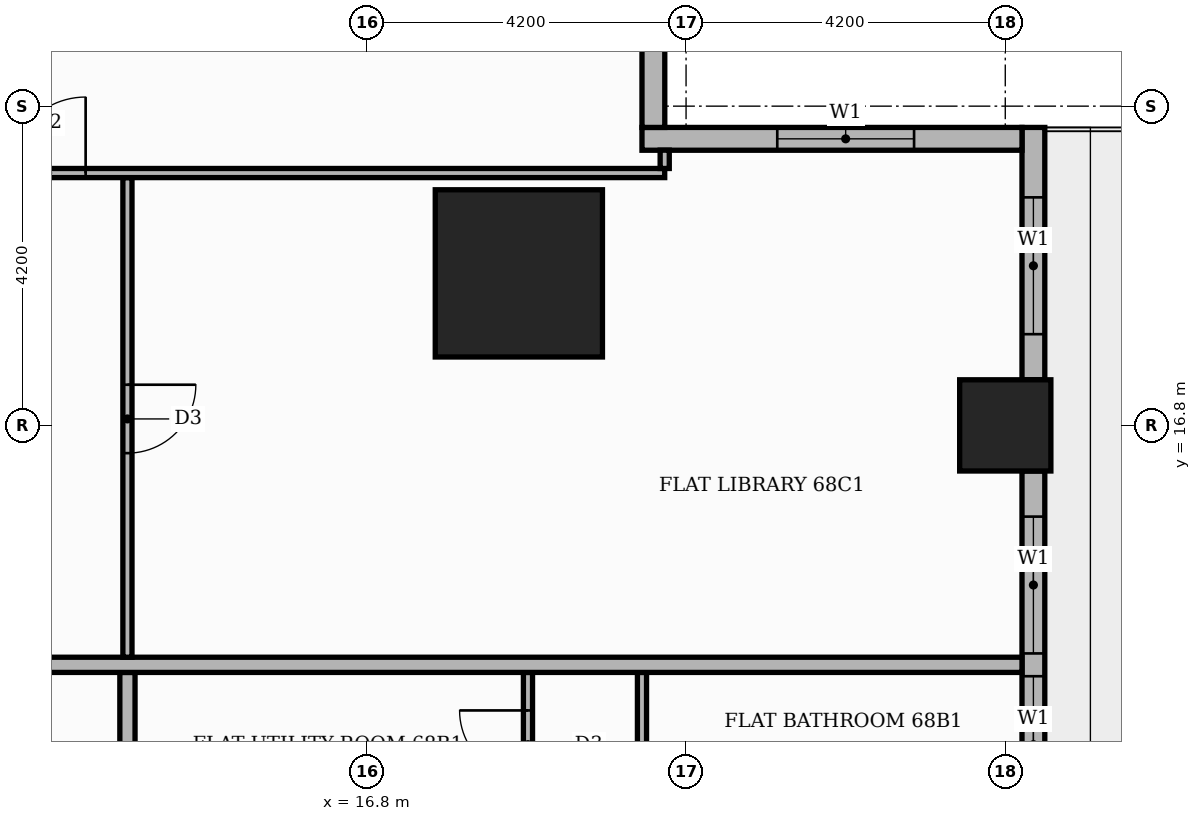
"""IFC4 building model, lengths in metres.
Left out: names, types, materials, properties, quantities, classifications, styles, units other than length and angle.
Written with IfcOpenShell. Run it as: python <this file> out.ifc"""

import sys

from ifc_helpers import new_model, si_unit, direction, frame, frame_2d, origin, origin_2d, place, context, subcontext, project, spatial, rectangle, extrude, element, fill, save


model = new_model("IFC4")
c1 = context("Model", 3, precision=1e-05, world=origin(), true_north=direction((0.0, 1.0)))
c2 = subcontext(c1, "Body", "Model", "MODEL_VIEW")
j1 = project(units=[si_unit("LENGTHUNIT", "METRE"), si_unit("PLANEANGLEUNIT", "RADIAN")], contexts=[c1])
p1 = place(None, origin())
s1 = spatial("IfcSite", under=j1, at=p1, CompositionType="ELEMENT")
p2 = place(p1, origin())
s2 = spatial("IfcBuilding", under=s1, at=p2, CompositionType="ELEMENT")
p3 = place(p2, frame((0.0, 0.0, 283.5)))
s3 = spatial("IfcBuildingStorey", under=s2, at=p3, CompositionType="ELEMENT", Elevation=283.5)
p4 = place(p3, frame((18.8, 18.8, 0.0), z_axis=(0.0, 0.0, 1.0), x_axis=(1.0, 0.0, 0.0)))
e1 = element("IfcColumn", 1, at=p4, inside=s3, PredefinedType="COLUMN", context=c2, shape_type="SweptSolid", body=[
    extrude(rectangle(XDim=2.2, YDim=2.2, at=origin_2d()), origin(), (0.0, 0.0, 1.0), 3.9),
])
p5 = place(p3, frame((25.2, 16.8, 0.0), z_axis=(0.0, 0.0, 1.0), x_axis=(1.0, 0.0, 0.0)))
e2 = element("IfcColumn", 2, at=p5, inside=s3, PredefinedType="COLUMN", context=c2, shape_type="SweptSolid", body=[
    extrude(rectangle(XDim=1.2, YDim=1.2, at=origin_2d()), origin(), (0.0, 0.0, 1.0), 3.9),
])
p6 = place(p3, frame((25.57, 9.0, 0.0), z_axis=(0.0, 0.0, 1.0), x_axis=(0.0, 1.0, 0.0)))
e3 = element("IfcWall", 3, at=p6, inside=s3, PredefinedType="STANDARD", context=c2, shape_type="SweptSolid", body=[
    extrude(rectangle(XDim=7.2, YDim=0.3, at=frame_2d((3.6, 0.0))), origin(), (0.0, 0.0, 1.0), 3.4),
])
p7 = place(p6, frame((0.6, 0.0, 0.9)))
e4 = element("IfcOpeningElement", 4, at=p7, cuts=e3, PredefinedType="OPENING", context=c2, shape_type="SweptSolid", body=[
    extrude(rectangle(XDim=1.8, YDim=2.1, at=frame_2d((0.9, 1.05))), frame((0.0, 0.16, 0.0), z_axis=(0.0, -1.0, 0.0), x_axis=(1.0, 0.0, 0.0)), (0.0, 0.0, 1.0), 0.32),
])
p8 = place(p6, frame((2.7, 0.0, 0.9)))
e5 = element("IfcOpeningElement", 5, at=p8, cuts=e3, PredefinedType="OPENING", context=c2, shape_type="SweptSolid", body=[
    extrude(rectangle(XDim=1.8, YDim=2.1, at=frame_2d((0.9, 1.05))), frame((0.0, 0.16, 0.0), z_axis=(0.0, -1.0, 0.0), x_axis=(1.0, 0.0, 0.0)), (0.0, 0.0, 1.0), 0.32),
])
p9 = place(p6, frame((4.8, 0.0, 0.9)))
e6 = element("IfcOpeningElement", 6, at=p9, cuts=e3, PredefinedType="OPENING", context=c2, shape_type="SweptSolid", body=[
    extrude(rectangle(XDim=1.8, YDim=2.1, at=frame_2d((0.9, 1.05))), frame((0.0, 0.16, 0.0), z_axis=(0.0, -1.0, 0.0), x_axis=(1.0, 0.0, 0.0)), (0.0, 0.0, 1.0), 0.32),
])
p10 = place(p3, frame((25.57, 17.4, 0.0), z_axis=(0.0, 0.0, 1.0), x_axis=(0.0, 1.0, 0.0)))
e7 = element("IfcWall", 7, at=p10, inside=s3, PredefinedType="STANDARD", context=c2, shape_type="SweptSolid", body=[
    extrude(rectangle(XDim=3.32, YDim=0.3, at=frame_2d((1.66, 0.0))), origin(), (0.0, 0.0, 1.0), 3.4),
])
p11 = place(p10, frame((0.6, 0.0, 0.9)))
e8 = element("IfcOpeningElement", 8, at=p11, cuts=e7, PredefinedType="OPENING", context=c2, shape_type="SweptSolid", body=[
    extrude(rectangle(XDim=1.8, YDim=2.1, at=frame_2d((0.9, 1.05))), frame((0.0, 0.16, 0.0), z_axis=(0.0, -1.0, 0.0), x_axis=(1.0, 0.0, 0.0)), (0.0, 0.0, 1.0), 0.32),
])
p12 = place(p3, frame((25.42, 20.57, 0.0), z_axis=(0.0, 0.0, 1.0), x_axis=(-1.0, 0.0, 0.0)))
e9 = element("IfcWall", 9, at=p12, inside=s3, PredefinedType="STANDARD", context=c2, shape_type="SweptSolid", body=[
    extrude(rectangle(XDim=5.0, YDim=0.3, at=frame_2d((2.5, 0.0))), origin(), (0.0, 0.0, 1.0), 3.4),
])
p13 = place(p12, frame((1.42, 0.0, 0.9)))
e10 = element("IfcOpeningElement", 10, at=p13, cuts=e9, PredefinedType="OPENING", context=c2, shape_type="SweptSolid", body=[
    extrude(rectangle(XDim=1.8, YDim=2.1, at=frame_2d((0.9, 1.05))), frame((0.0, 0.16, 0.0), z_axis=(0.0, -1.0, 0.0), x_axis=(1.0, 0.0, 0.0)), (0.0, 0.0, 1.0), 0.32),
])
p14 = place(p3, frame((20.57, 20.72, 0.0), z_axis=(0.0, 0.0, 1.0), x_axis=(0.0, 1.0, 0.0)))
e11 = element("IfcWall", 11, at=p14, inside=s3, PredefinedType="STANDARD", context=c2, shape_type="SweptSolid", body=[
    extrude(rectangle(XDim=5.0, YDim=0.3, at=frame_2d((2.5, 0.0))), origin(), (0.0, 0.0, 1.0), 3.4),
])
p15 = place(p14, frame((1.48, 0.0, 0.9)))
e12 = element("IfcOpeningElement", 12, at=p15, cuts=e11, PredefinedType="OPENING", context=c2, shape_type="SweptSolid", body=[
    extrude(rectangle(XDim=1.8, YDim=2.1, at=frame_2d((0.9, 1.05))), frame((0.0, 0.16, 0.0), z_axis=(0.0, -1.0, 0.0), x_axis=(1.0, 0.0, 0.0)), (0.0, 0.0, 1.0), 0.32),
])
p16 = place(p3, frame((13.65, 11.1, 0.0), z_axis=(0.0, 0.0, 1.0), x_axis=(0.0, 1.0, 0.0)))
e13 = element("IfcWall", 13, at=p16, inside=s3, PredefinedType="PARTITIONING", context=c2, shape_type="SweptSolid", body=[
    extrude(rectangle(XDim=2.45, YDim=0.2, at=frame_2d((1.225, 0.0))), origin(), (0.0, 0.0, 1.0), 3.4),
])
p17 = place(p3, frame((18.92, 11.61, 0.0), z_axis=(0.0, 0.0, 1.0), x_axis=(0.0, 1.0, 0.0)))
e14 = element("IfcWall", 14, at=p17, inside=s3, PredefinedType="PARTITIONING", context=c2, shape_type="SweptSolid", body=[
    extrude(rectangle(XDim=1.94, YDim=0.12, at=frame_2d((0.97, 0.0))), origin(), (0.0, 0.0, 1.0), 3.4),
])
p18 = place(p17, frame((0.54, 0.0, 0.0)))
e15 = element("IfcOpeningElement", 15, at=p18, cuts=e14, PredefinedType="OPENING", context=c2, shape_type="SweptSolid", body=[
    extrude(rectangle(XDim=0.9, YDim=2.1, at=frame_2d((0.45, 1.05))), frame((0.0, 0.07, 0.0), z_axis=(0.0, -1.0, 0.0), x_axis=(1.0, 0.0, 0.0)), (0.0, 0.0, 1.0), 0.14),
])
p19 = place(p3, frame((20.42, 11.61, 0.0), z_axis=(0.0, 0.0, 1.0), x_axis=(0.0, 1.0, 0.0)))
e16 = element("IfcWall", 16, at=p19, inside=s3, PredefinedType="PARTITIONING", context=c2, shape_type="SweptSolid", body=[
    extrude(rectangle(XDim=1.94, YDim=0.12, at=frame_2d((0.97, 0.0))), origin(), (0.0, 0.0, 1.0), 3.4),
])
p20 = place(p3, frame((-13.65, 13.65, 0.0), z_axis=(0.0, 0.0, 1.0), x_axis=(1.0, 0.0, 0.0)))
e17 = element("IfcWall", 17, at=p20, inside=s3, PredefinedType="PARTITIONING", context=c2, shape_type="SweptSolid", body=[
    extrude(rectangle(XDim=39.07, YDim=0.2, at=frame_2d((19.535, 0.0))), origin(), (0.0, 0.0, 1.0), 3.4),
])
p21 = place(p20, frame((23.6, 0.0, 0.0)))
e18 = element("IfcOpeningElement", 18, at=p21, cuts=e17, PredefinedType="OPENING", context=c2, shape_type="SweptSolid", body=[
    extrude(rectangle(XDim=1.1, YDim=2.4, at=frame_2d((0.55, 1.2))), frame((0.0, 0.11, 0.0), z_axis=(0.0, -1.0, 0.0), x_axis=(1.0, 0.0, 0.0)), (0.0, 0.0, 1.0), 0.22),
])
p22 = place(p3, frame((13.65, 13.75, 0.0), z_axis=(0.0, 0.0, 1.0), x_axis=(0.0, 1.0, 0.0)))
e19 = element("IfcWall", 19, at=p22, inside=s3, PredefinedType="PARTITIONING", context=c2, shape_type="SweptSolid", body=[
    extrude(rectangle(XDim=6.31, YDim=0.12, at=frame_2d((3.155, 0.0))), origin(), (0.0, 0.0, 1.0), 3.4),
])
p23 = place(p22, frame((2.685, 0.0, 0.0)))
e20 = element("IfcOpeningElement", 20, at=p23, cuts=e19, PredefinedType="OPENING", context=c2, shape_type="SweptSolid", body=[
    extrude(rectangle(XDim=0.9, YDim=2.1, at=frame_2d((0.45, 1.05))), frame((0.0, 0.07, 0.0), z_axis=(0.0, -1.0, 0.0), x_axis=(1.0, 0.0, 0.0)), (0.0, 0.0, 1.0), 0.14),
])
p24 = place(p3, frame((-13.55, 20.12, 0.0), z_axis=(0.0, 0.0, 1.0), x_axis=(1.0, 0.0, 0.0)))
e21 = element("IfcWall", 21, at=p24, inside=s3, PredefinedType="PARTITIONING", context=c2, shape_type="SweptSolid", body=[
    extrude(rectangle(XDim=34.269, YDim=0.12, at=frame_2d((17.135, 0.0))), origin(), (0.0, 0.0, 1.0), 3.4),
])
p25 = place(p24, frame((25.65, 0.0, 0.0)))
e22 = element("IfcOpeningElement", 22, at=p25, cuts=e21, PredefinedType="OPENING", context=c2, shape_type="SweptSolid", body=[
    extrude(rectangle(XDim=1.0, YDim=2.1, at=frame_2d((0.5, 1.05))), frame((0.0, 0.07, 0.0), z_axis=(0.0, -1.0, 0.0), x_axis=(1.0, 0.0, 0.0)), (0.0, 0.0, 1.0), 0.14),
])
p26 = place(p24, frame((22.55, 0.0, 0.0)))
e23 = element("IfcOpeningElement", 23, at=p26, cuts=e21, PredefinedType="OPENING", context=c2, shape_type="SweptSolid", body=[
    extrude(rectangle(XDim=0.9, YDim=2.1, at=frame_2d((0.45, 1.05))), frame((0.0, 0.07, 0.0), z_axis=(0.0, -1.0, 0.0), x_axis=(1.0, 0.0, 0.0)), (0.0, 0.0, 1.0), 0.14),
])
p27 = place(p24, frame((18.35, 0.0, 0.0)))
e24 = element("IfcOpeningElement", 24, at=p27, cuts=e21, PredefinedType="OPENING", context=c2, shape_type="SweptSolid", body=[
    extrude(rectangle(XDim=0.9, YDim=2.1, at=frame_2d((0.45, 1.05))), frame((0.0, 0.07, 0.0), z_axis=(0.0, -1.0, 0.0), x_axis=(1.0, 0.0, 0.0)), (0.0, 0.0, 1.0), 0.14),
])
p28 = place(p24, frame((9.95, 0.0, 0.0)))
e25 = element("IfcOpeningElement", 25, at=p28, cuts=e21, PredefinedType="OPENING", context=c2, shape_type="SweptSolid", body=[
    extrude(rectangle(XDim=0.9, YDim=2.1, at=frame_2d((0.45, 1.05))), frame((0.0, 0.07, 0.0), z_axis=(0.0, -1.0, 0.0), x_axis=(1.0, 0.0, 0.0)), (0.0, 0.0, 1.0), 0.14),
])
p29 = place(p24, frame((3.65, 0.0, 0.0)))
e26 = element("IfcOpeningElement", 26, at=p29, cuts=e21, PredefinedType="OPENING", context=c2, shape_type="SweptSolid", body=[
    extrude(rectangle(XDim=0.9, YDim=2.1, at=frame_2d((0.45, 1.05))), frame((0.0, 0.07, 0.0), z_axis=(0.0, -1.0, 0.0), x_axis=(1.0, 0.0, 0.0)), (0.0, 0.0, 1.0), 0.14),
])
p30 = place(p3, frame((20.719, 20.18, 0.0), z_axis=(0.0, 0.0, 1.0), x_axis=(0.0, 1.0, 0.0)))
e27 = element("IfcWall", 27, at=p30, inside=s3, PredefinedType="PARTITIONING", context=c2, shape_type="SweptSolid", body=[
    extrude(rectangle(XDim=0.241, YDim=0.12, at=frame_2d((0.121, 0.0))), origin(), (0.0, 0.0, 1.0), 3.4),
])
p31 = place(p8, origin())
e28 = element("IfcWindow", 28, at=p31, inside=s3, PartitioningType="SINGLE_PANEL", PredefinedType="WINDOW", context=c2, shape_type="SweptSolid", body=[
    extrude(rectangle(XDim=1.8, YDim=2.1, at=frame_2d((0.9, 1.05))), frame((0.0, 0.03, 0.0), z_axis=(0.0, -1.0, 0.0), x_axis=(1.0, 0.0, 0.0)), (0.0, 0.0, 1.0), 0.06),
])
fill(e5, e28)
p32 = place(p9, origin())
e29 = element("IfcWindow", 29, at=p32, inside=s3, PartitioningType="SINGLE_PANEL", PredefinedType="WINDOW", context=c2, shape_type="SweptSolid", body=[
    extrude(rectangle(XDim=1.8, YDim=2.1, at=frame_2d((0.9, 1.05))), frame((0.0, 0.03, 0.0), z_axis=(0.0, -1.0, 0.0), x_axis=(1.0, 0.0, 0.0)), (0.0, 0.0, 1.0), 0.06),
])
fill(e6, e29)
p33 = place(p11, origin())
e30 = element("IfcWindow", 30, at=p33, inside=s3, PartitioningType="SINGLE_PANEL", PredefinedType="WINDOW", context=c2, shape_type="SweptSolid", body=[
    extrude(rectangle(XDim=1.8, YDim=2.1, at=frame_2d((0.9, 1.05))), frame((0.0, 0.03, 0.0), z_axis=(0.0, -1.0, 0.0), x_axis=(1.0, 0.0, 0.0)), (0.0, 0.0, 1.0), 0.06),
])
fill(e8, e30)
p34 = place(p13, origin())
e31 = element("IfcWindow", 31, at=p34, inside=s3, PartitioningType="SINGLE_PANEL", PredefinedType="WINDOW", context=c2, shape_type="SweptSolid", body=[
    extrude(rectangle(XDim=1.8, YDim=2.1, at=frame_2d((0.9, 1.05))), frame((0.0, 0.03, 0.0), z_axis=(0.0, -1.0, 0.0), x_axis=(1.0, 0.0, 0.0)), (0.0, 0.0, 1.0), 0.06),
])
fill(e10, e31)
p35 = place(p18, origin())
e32 = element("IfcDoor", 32, at=p35, inside=s3, OperationType="SINGLE_SWING_RIGHT", PredefinedType="DOOR", context=c2, shape_type="SweptSolid", body=[
    extrude(rectangle(XDim=0.9, YDim=2.1, at=frame_2d((0.45, 1.05))), frame((0.0, 0.025, 0.0), z_axis=(0.0, -1.0, 0.0), x_axis=(1.0, 0.0, 0.0)), (0.0, 0.0, 1.0), 0.05),
])
fill(e15, e32)
p36 = place(p23, frame((0.9, 0.0, 0.0), z_axis=(0.0, 0.0, 1.0), x_axis=(-1.0, 0.0, 0.0)))
e33 = element("IfcDoor", 33, at=p36, inside=s3, OperationType="SINGLE_SWING_RIGHT", PredefinedType="DOOR", context=c2, shape_type="SweptSolid", body=[
    extrude(rectangle(XDim=0.9, YDim=2.1, at=frame_2d((0.45, 1.05))), frame((0.0, 0.025, 0.0), z_axis=(0.0, -1.0, 0.0), x_axis=(1.0, 0.0, 0.0)), (0.0, 0.0, 1.0), 0.05),
])
fill(e20, e33)
p37 = place(p25, origin())
e34 = element("IfcDoor", 34, at=p37, inside=s3, OperationType="SINGLE_SWING_RIGHT", PredefinedType="DOOR", context=c2, shape_type="SweptSolid", body=[
    extrude(rectangle(XDim=1.0, YDim=2.1, at=frame_2d((0.5, 1.05))), frame((0.0, 0.025, 0.0), z_axis=(0.0, -1.0, 0.0), x_axis=(1.0, 0.0, 0.0)), (0.0, 0.0, 1.0), 0.05),
])
fill(e22, e34)
save(model, sys.argv[1])
